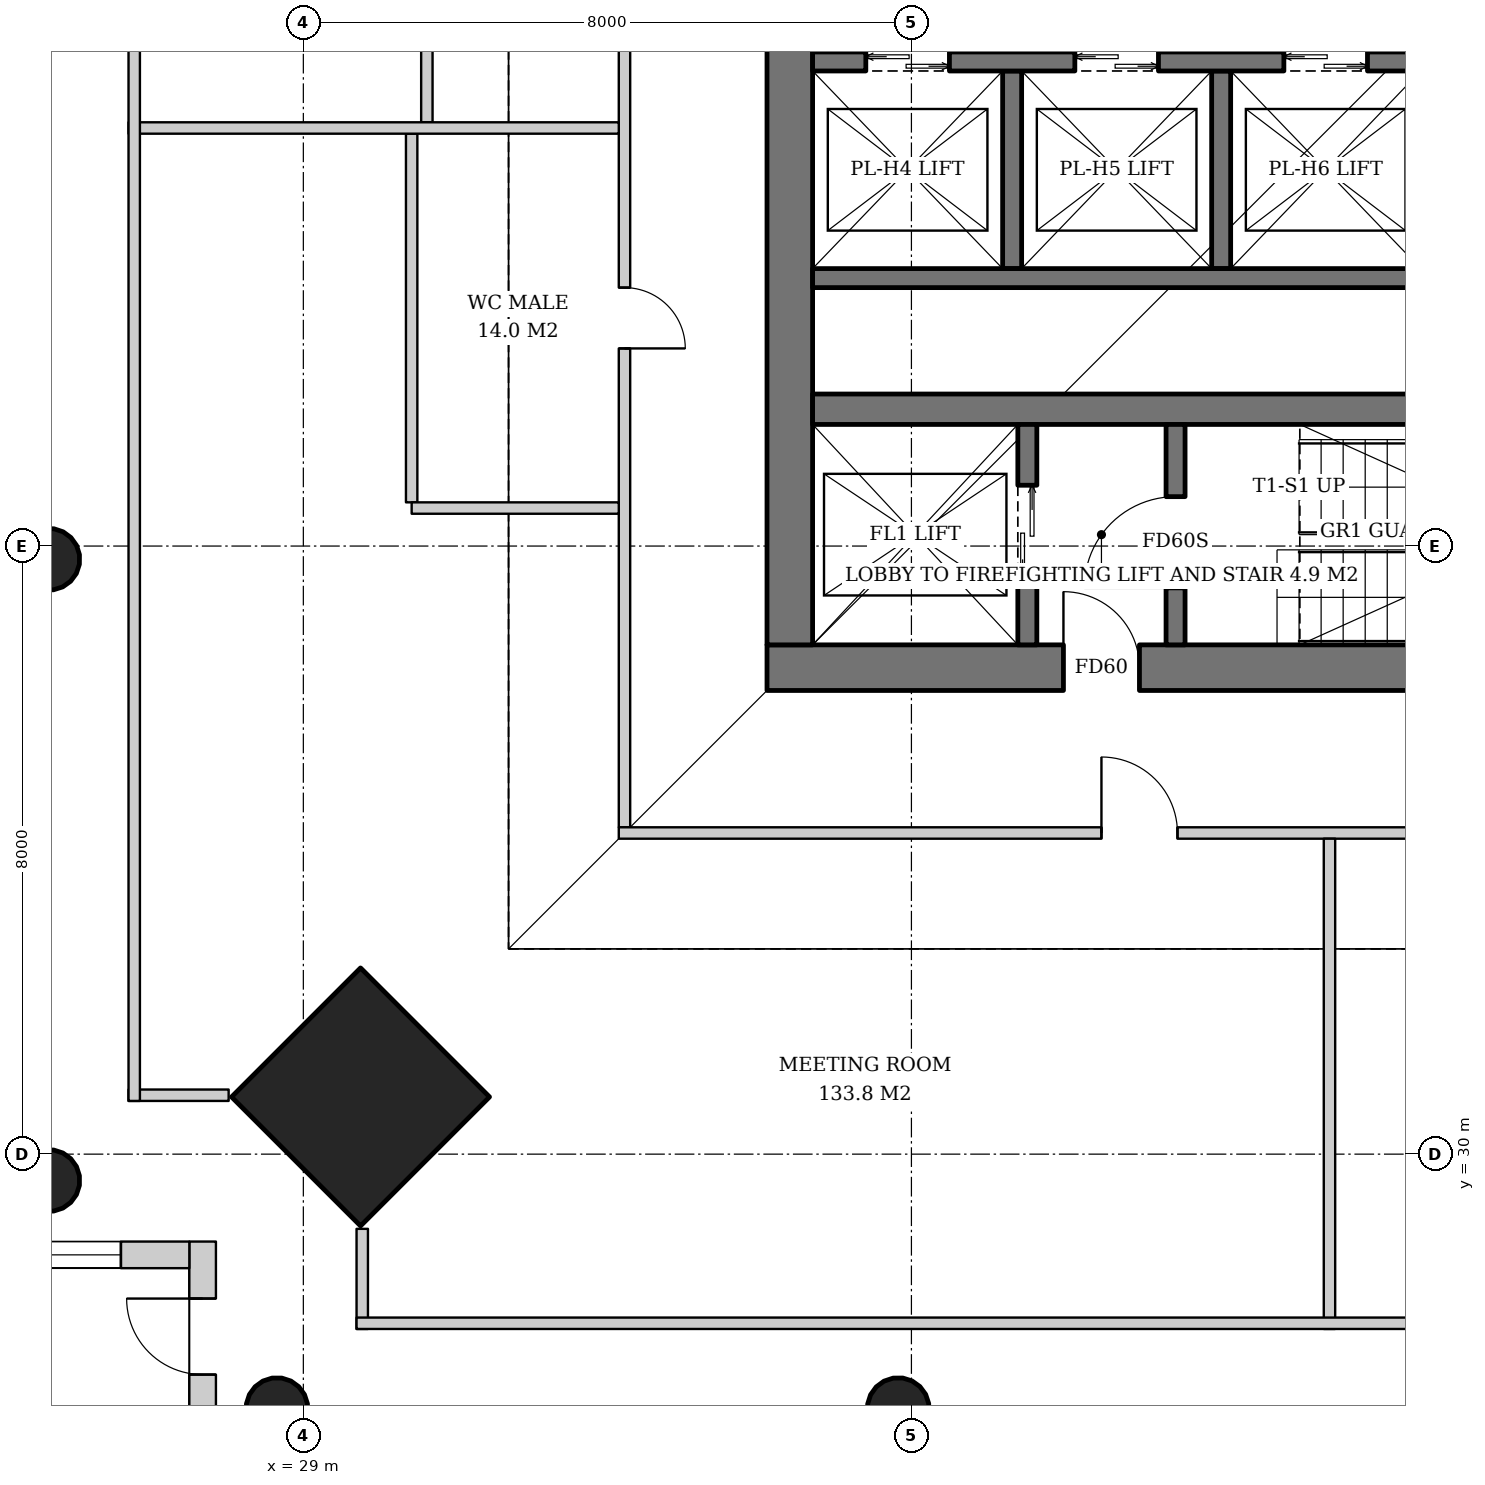
"""IFC4 building model, lengths in metres.
Left out: names, types, materials, properties, quantities, classifications, styles, units other than length and angle.
Written with IfcOpenShell. Run it as: python <this file> out.ifc"""

import sys

from ifc_helpers import new_model, si_unit, direction, frame, frame_2d, origin, origin_2d, place, context, subcontext, project, spatial, rectangle, hollow_circle, extrude, element, fill, save


model = new_model("IFC4")
c1 = context("Model", 3, precision=1e-05, world=origin(), true_north=direction((0.0, 1.0)))
c2 = subcontext(c1, "Body", "Model", "MODEL_VIEW")
j1 = project(units=[si_unit("LENGTHUNIT", "METRE"), si_unit("PLANEANGLEUNIT", "RADIAN")], contexts=[c1])
p1 = place(None, origin())
s1 = spatial("IfcSite", under=j1, at=p1, CompositionType="ELEMENT")
p2 = place(p1, origin())
s2 = spatial("IfcBuilding", under=s1, at=p2, CompositionType="ELEMENT")
p3 = place(p2, frame((0.0, 0.0, 165.4)))
s3 = spatial("IfcBuildingStorey", under=s2, at=p3, CompositionType="ELEMENT", Elevation=165.4)
p4 = place(p3, frame((29.714, 30.714, 0.0), z_axis=(0.031898107953, 0.031898107953, 0.998981992539), x_axis=(-0.707106781187, 0.707106781187, 0.0)))
e1 = element("IfcColumn", 1, at=p4, inside=s3, PredefinedType="COLUMN", context=c2, shape_type="SweptSolid", body=[
    extrude(rectangle(XDim=2.4, YDim=2.4, at=origin_2d()), origin(), (0.0, 0.0, 1.0), 3.804),
])
p5 = place(p3, frame((25.614, 29.614, 0.0), z_axis=(0.031898107953, 0.031898107953, 0.998981992539), x_axis=(-0.707106781187, 0.707106781187, 0.0)))
e2 = element("IfcColumn", 2, at=p5, inside=s3, PredefinedType="COLUMN", context=c2, shape_type="SweptSolid", body=[
    extrude(hollow_circle(Radius=0.406, WallThickness=0.03, at=origin_2d()), origin(), (0.0, 0.0, 1.0), 3.804),
])
p6 = place(p3, frame((25.614, 37.807, 0.0), z_axis=(0.031910269556, 0.015987237665, 0.999362868496), x_axis=(-0.447933021895, 0.894067115991, 0.0)))
e3 = element("IfcColumn", 3, at=p6, inside=s3, PredefinedType="COLUMN", context=c2, shape_type="SweptSolid", body=[
    extrude(hollow_circle(Radius=0.406, WallThickness=0.03, at=origin_2d()), origin(), (0.0, 0.0, 1.0), 3.802),
])
p7 = place(p3, frame((28.614, 26.614, 0.0), z_axis=(0.031898107953, 0.031898107953, 0.998981992539), x_axis=(-0.707106781187, 0.707106781187, 0.0)))
e4 = element("IfcColumn", 4, at=p7, inside=s3, PredefinedType="COLUMN", context=c2, shape_type="SweptSolid", body=[
    extrude(hollow_circle(Radius=0.406, WallThickness=0.03, at=origin_2d()), origin(), (0.0, 0.0, 1.0), 3.804),
])
p8 = place(p3, frame((36.807, 26.614, 0.0), z_axis=(0.015987237665, 0.031910269556, 0.999362868496), x_axis=(-0.894067115991, 0.447933021895, 0.0)))
e5 = element("IfcColumn", 5, at=p8, inside=s3, PredefinedType="COLUMN", context=c2, shape_type="SweptSolid", body=[
    extrude(hollow_circle(Radius=0.406, WallThickness=0.03, at=origin_2d()), origin(), (0.0, 0.0, 1.0), 3.802),
])
p9 = place(p3, frame((35.1, 36.4, 0.0), z_axis=(0.0, 0.0, 1.0), x_axis=(1.0, 0.0, 0.0)))
e6 = element("IfcWall", 6, at=p9, inside=s3, PredefinedType="SHEAR", context=c2, shape_type="SweptSolid", body=[
    extrude(rectangle(XDim=19.8, YDim=0.6, at=frame_2d((9.9, 0.0))), origin(), (0.0, 0.0, 1.0), 3.8),
])
p10 = place(p9, frame((3.9, 0.0, 0.0)))
e7 = element("IfcOpeningElement", 7, at=p10, cuts=e6, PredefinedType="OPENING", context=c2, shape_type="SweptSolid", body=[
    extrude(rectangle(XDim=1.0, YDim=2.1, at=frame_2d((0.5, 1.05))), frame((0.0, 0.31, 0.0), z_axis=(0.0, -1.0, 0.0), x_axis=(1.0, 0.0, 0.0)), (0.0, 0.0, 1.0), 0.62),
])
p11 = place(p9, frame((15.35, 0.0, 0.0)))
e8 = element("IfcOpeningElement", 8, at=p11, cuts=e6, PredefinedType="OPENING", context=c2, shape_type="SweptSolid", body=[
    extrude(rectangle(XDim=1.0, YDim=2.1, at=frame_2d((0.5, 1.05))), frame((0.0, 0.31, 0.0), z_axis=(0.0, -1.0, 0.0), x_axis=(1.0, 0.0, 0.0)), (0.0, 0.0, 1.0), 0.62),
])
p12 = place(p3, frame((35.4, 36.7, 0.0), z_axis=(0.0, 0.0, 1.0), x_axis=(0.0, 1.0, 0.0)))
e9 = element("IfcWall", 9, at=p12, inside=s3, PredefinedType="SHEAR", context=c2, shape_type="SweptSolid", body=[
    extrude(rectangle(XDim=18.6, YDim=0.6, at=frame_2d((9.3, 0.0))), origin(), (0.0, 0.0, 1.0), 3.8),
])
p13 = place(p12, frame((8.4, 0.0, 0.0)))
e10 = element("IfcOpeningElement", 10, at=p13, cuts=e9, PredefinedType="OPENING", context=c2, shape_type="SweptSolid", body=[
    extrude(rectangle(XDim=1.8, YDim=2.4, at=frame_2d((0.9, 1.2))), frame((0.0, 0.31, 0.0), z_axis=(0.0, -1.0, 0.0), x_axis=(1.0, 0.0, 0.0)), (0.0, 0.0, 1.0), 0.62),
])
p14 = place(p3, frame((35.7, 39.8, 0.0), z_axis=(0.0, 0.0, 1.0), x_axis=(1.0, 0.0, 0.0)))
e11 = element("IfcWall", 11, at=p14, inside=s3, PredefinedType="SHEAR", context=c2, shape_type="SweptSolid", body=[
    extrude(rectangle(XDim=18.6, YDim=0.4, at=frame_2d((9.3, 0.0))), origin(), (0.0, 0.0, 1.0), 3.8),
])
p15 = place(p3, frame((27.675, 25.5, 0.0), z_axis=(0.0, 0.0, 1.0), x_axis=(0.0, 1.0, 0.0)))
e12 = element("IfcWall", 12, at=p15, inside=s3, PredefinedType="SOLIDWALL", context=c2, shape_type="SweptSolid", body=[
    extrude(rectangle(XDim=3.35, YDim=0.35, at=frame_2d((1.675, 0.0))), origin(), (0.0, 0.0, 1.0), 3.62),
])
p16 = place(p15, frame((1.6, 0.0, 0.0)))
e13 = element("IfcOpeningElement", 13, at=p16, cuts=e12, PredefinedType="OPENING", context=c2, shape_type="SweptSolid", body=[
    extrude(rectangle(XDim=1.0, YDim=2.4, at=frame_2d((0.5, 1.2))), frame((0.0, 0.185, 0.0), z_axis=(0.0, -1.0, 0.0), x_axis=(1.0, 0.0, 0.0)), (0.0, 0.0, 1.0), 0.37),
])
p17 = place(p3, frame((27.5, 28.675, 0.0), z_axis=(0.0, 0.0, 1.0), x_axis=(-1.0, 0.0, 0.0)))
e14 = element("IfcWall", 14, at=p17, inside=s3, PredefinedType="SOLIDWALL", context=c2, shape_type="SweptSolid", body=[
    extrude(rectangle(XDim=3.0, YDim=0.35, at=frame_2d((1.5, 0.0))), origin(), (0.0, 0.0, 1.0), 3.62),
])
p18 = place(p17, frame((0.9, 0.0, 0.6)))
e15 = element("IfcOpeningElement", 15, at=p18, cuts=e14, PredefinedType="OPENING", context=c2, shape_type="SweptSolid", body=[
    extrude(rectangle(XDim=1.2, YDim=2.55, at=frame_2d((0.6, 1.275))), frame((0.0, 0.185, 0.0), z_axis=(0.0, -1.0, 0.0), x_axis=(1.0, 0.0, 0.0)), (0.0, 0.0, 1.0), 0.37),
])
p19 = place(p3, frame((38.525, 36.7, 0.0), z_axis=(0.0, 0.0, 1.0), x_axis=(0.0, 1.0, 0.0)))
e16 = element("IfcWall", 16, at=p19, inside=s3, PredefinedType="SHEAR", context=c2, shape_type="SweptSolid", body=[
    extrude(rectangle(XDim=2.9, YDim=0.25, at=frame_2d((1.45, 0.0))), origin(), (0.0, 0.0, 1.0), 3.8),
])
p20 = place(p19, frame((0.8, 0.0, 0.0)))
e17 = element("IfcOpeningElement", 17, at=p20, cuts=e16, PredefinedType="OPENING", context=c2, shape_type="SweptSolid", body=[
    extrude(rectangle(XDim=1.3, YDim=2.2, at=frame_2d((0.65, 1.1))), frame((0.0, 0.135, 0.0), z_axis=(0.0, -1.0, 0.0), x_axis=(1.0, 0.0, 0.0)), (0.0, 0.0, 1.0), 0.27),
])
p21 = place(p3, frame((40.475, 36.7, 0.0), z_axis=(0.0, 0.0, 1.0), x_axis=(0.0, 1.0, 0.0)))
e18 = element("IfcWall", 18, at=p21, inside=s3, PredefinedType="SHEAR", context=c2, shape_type="SweptSolid", body=[
    extrude(rectangle(XDim=2.9, YDim=0.25, at=frame_2d((1.45, 0.0))), origin(), (0.0, 0.0, 1.0), 3.8),
])
p22 = place(p21, frame((0.75, 0.0, 0.0)))
e19 = element("IfcOpeningElement", 19, at=p22, cuts=e18, PredefinedType="OPENING", context=c2, shape_type="SweptSolid", body=[
    extrude(rectangle(XDim=1.2, YDim=2.1, at=frame_2d((0.6, 1.05))), frame((0.0, 0.135, 0.0), z_axis=(0.0, -1.0, 0.0), x_axis=(1.0, 0.0, 0.0)), (0.0, 0.0, 1.0), 0.27),
])
for number, where, z_axis, x_axis in (
    (20, (38.325, 44.25, 0.0), (0.0, 0.0, 1.0), (0.0, -1.0, 0.0)),
    (21, (41.075, 44.25, 0.0), (0.0, 0.0, 1.0), (0.0, -1.0, 0.0)),
):
    element("IfcWall", number, at=place(p3, frame(where, z_axis=z_axis, x_axis=x_axis)), inside=s3, PredefinedType="SHEAR", context=c2, shape_type="SweptSolid", body=[
        extrude(rectangle(XDim=2.6, YDim=0.25, at=frame_2d((1.3, 0.0))), origin(), (0.0, 0.0, 1.0), 3.8),
    ])
p23 = place(p3, frame((35.7, 41.525, 0.0), z_axis=(0.0, 0.0, 1.0), x_axis=(1.0, 0.0, 0.0)))
e22 = element("IfcWall", 22, at=p23, inside=s3, PredefinedType="SHEAR", context=c2, shape_type="SweptSolid", body=[
    extrude(rectangle(XDim=11.0, YDim=0.25, at=frame_2d((5.5, 0.0))), origin(), (0.0, 0.0, 1.0), 3.8),
])
p24 = place(p3, frame((35.7, 44.375, 0.0), z_axis=(0.0, 0.0, 1.0), x_axis=(1.0, 0.0, 0.0)))
e23 = element("IfcWall", 23, at=p24, inside=s3, PredefinedType="SHEAR", context=c2, shape_type="SweptSolid", body=[
    extrude(rectangle(XDim=12.83, YDim=0.25, at=frame_2d((6.415, 0.0))), origin(), (0.0, 0.0, 1.0), 3.8),
])
p25 = place(p24, frame((0.7, 0.0, 0.0)))
e24 = element("IfcOpeningElement", 24, at=p25, cuts=e23, PredefinedType="OPENING", context=c2, shape_type="SweptSolid", body=[
    extrude(rectangle(XDim=1.1, YDim=2.2, at=frame_2d((0.55, 1.1))), frame((0.0, 0.135, 0.0), z_axis=(0.0, -1.0, 0.0), x_axis=(1.0, 0.0, 0.0)), (0.0, 0.0, 1.0), 0.27),
])
p26 = place(p24, frame((3.45, 0.0, 0.0)))
e25 = element("IfcOpeningElement", 25, at=p26, cuts=e23, PredefinedType="OPENING", context=c2, shape_type="SweptSolid", body=[
    extrude(rectangle(XDim=1.1, YDim=2.2, at=frame_2d((0.55, 1.1))), frame((0.0, 0.135, 0.0), z_axis=(0.0, -1.0, 0.0), x_axis=(1.0, 0.0, 0.0)), (0.0, 0.0, 1.0), 0.27),
])
p27 = place(p24, frame((6.2, 0.0, 0.0)))
e26 = element("IfcOpeningElement", 26, at=p27, cuts=e23, PredefinedType="OPENING", context=c2, shape_type="SweptSolid", body=[
    extrude(rectangle(XDim=1.1, YDim=2.2, at=frame_2d((0.55, 1.1))), frame((0.0, 0.135, 0.0), z_axis=(0.0, -1.0, 0.0), x_axis=(1.0, 0.0, 0.0)), (0.0, 0.0, 1.0), 0.27),
])
p28 = place(p24, frame((9.0, 0.0, 0.0)))
e27 = element("IfcOpeningElement", 27, at=p28, cuts=e23, PredefinedType="OPENING", context=c2, shape_type="SweptSolid", body=[
    extrude(rectangle(XDim=1.0, YDim=2.1, at=frame_2d((0.5, 1.05))), frame((0.0, 0.135, 0.0), z_axis=(0.0, -1.0, 0.0), x_axis=(1.0, 0.0, 0.0)), (0.0, 0.0, 1.0), 0.27),
])
p29 = place(p24, frame((11.515, 0.0, 0.0)))
e28 = element("IfcOpeningElement", 28, at=p29, cuts=e23, PredefinedType="OPENING", context=c2, shape_type="SweptSolid", body=[
    extrude(rectangle(XDim=0.8, YDim=2.0, at=frame_2d((0.4, 1.0))), frame((0.0, 0.135, 0.0), z_axis=(0.0, -1.0, 0.0), x_axis=(1.0, 0.0, 0.0)), (0.0, 0.0, 1.0), 0.27),
])
for number, where, z_axis, x_axis in (
    (29, (30.625, 48.425, 0.0), (0.0, 0.0, 1.0), (0.0, -1.0, 0.0)),
    (30, (30.425, 43.425, 0.0), (0.0, 0.0, 1.0), (0.0, -1.0, 0.0)),
):
    element("IfcWall", number, at=place(p3, frame(where, z_axis=z_axis, x_axis=x_axis)), inside=s3, PredefinedType="PARTITIONING", context=c2, shape_type="SweptSolid", body=[
        extrude(rectangle(XDim=4.85, YDim=0.15, at=frame_2d((2.425, 0.0))), origin(), (0.0, 0.0, 1.0), 2.85),
    ])
p30 = place(p3, frame((33.225, 57.85, 0.0), z_axis=(0.0, 0.0, 1.0), x_axis=(0.0, -1.0, 0.0)))
e31 = element("IfcWall", 31, at=p30, inside=s3, PredefinedType="PARTITIONING", context=c2, shape_type="SweptSolid", body=[
    extrude(rectangle(XDim=23.55, YDim=0.15, at=frame_2d((11.775, 0.0))), origin(), (0.0, 0.0, 1.0), 2.85),
])
p31 = place(p30, frame((6.45, 0.0, 0.0)))
e32 = element("IfcOpeningElement", 32, at=p31, cuts=e31, PredefinedType="OPENING", context=c2, shape_type="SweptSolid", body=[
    extrude(rectangle(XDim=0.8, YDim=2.1, at=frame_2d((0.4, 1.05))), frame((0.0, 0.085, 0.0), z_axis=(0.0, -1.0, 0.0), x_axis=(1.0, 0.0, 0.0)), (0.0, 0.0, 1.0), 0.17),
])
p32 = place(p30, frame((11.35, 0.0, 0.0)))
e33 = element("IfcOpeningElement", 33, at=p32, cuts=e31, PredefinedType="OPENING", context=c2, shape_type="SweptSolid", body=[
    extrude(rectangle(XDim=1.0, YDim=2.1, at=frame_2d((0.5, 1.05))), frame((0.0, 0.085, 0.0), z_axis=(0.0, -1.0, 0.0), x_axis=(1.0, 0.0, 0.0)), (0.0, 0.0, 1.0), 0.17),
])
p33 = place(p30, frame((16.45, 0.0, 0.0)))
e34 = element("IfcOpeningElement", 34, at=p33, cuts=e31, PredefinedType="OPENING", context=c2, shape_type="SweptSolid", body=[
    extrude(rectangle(XDim=0.8, YDim=2.1, at=frame_2d((0.4, 1.05))), frame((0.0, 0.085, 0.0), z_axis=(0.0, -1.0, 0.0), x_axis=(1.0, 0.0, 0.0)), (0.0, 0.0, 1.0), 0.17),
])
p34 = place(p30, frame((1.3, 0.0, 0.0)))
e35 = element("IfcOpeningElement", 35, at=p34, cuts=e31, PredefinedType="OPENING", context=c2, shape_type="SweptSolid", body=[
    extrude(rectangle(XDim=1.8, YDim=2.4, at=frame_2d((0.9, 1.2))), frame((0.0, 0.085, 0.0), z_axis=(0.0, -1.0, 0.0), x_axis=(1.0, 0.0, 0.0)), (0.0, 0.0, 1.0), 0.17),
])
p35 = place(p3, frame((33.15, 43.5, 0.0), z_axis=(0.0, 0.0, 1.0), x_axis=(-1.0, 0.0, 0.0)))
e36 = element("IfcWall", 36, at=p35, inside=s3, PredefinedType="PARTITIONING", context=c2, shape_type="SweptSolid", body=[
    extrude(rectangle(XDim=6.45, YDim=0.15, at=frame_2d((3.225, 0.0))), origin(), (0.0, 0.0, 1.0), 3.62),
])
p36 = place(p3, frame((33.15, 38.5, 0.0), z_axis=(0.0, 0.0, 1.0), x_axis=(-1.0, 0.0, 0.0)))
e37 = element("IfcWall", 37, at=p36, inside=s3, PredefinedType="PARTITIONING", context=c2, shape_type="SweptSolid", body=[
    extrude(rectangle(XDim=2.725, YDim=0.15, at=frame_2d((1.362, 0.0))), origin(), (0.0, 0.0, 1.0), 3.62),
])
p37 = place(p3, frame((33.15, 34.225, 0.0), z_axis=(0.0, 0.0, 1.0), x_axis=(1.0, 0.0, 0.0)))
e38 = element("IfcWall", 38, at=p37, inside=s3, PredefinedType="PARTITIONING", context=c2, shape_type="SweptSolid", body=[
    extrude(rectangle(XDim=23.55, YDim=0.15, at=frame_2d((11.775, 0.0))), origin(), (0.0, 0.0, 1.0), 2.85),
])
p38 = place(p37, frame((6.35, 0.0, 0.0)))
e39 = element("IfcOpeningElement", 39, at=p38, cuts=e38, PredefinedType="OPENING", context=c2, shape_type="SweptSolid", body=[
    extrude(rectangle(XDim=1.0, YDim=2.1, at=frame_2d((0.5, 1.05))), frame((0.0, 0.085, 0.0), z_axis=(0.0, -1.0, 0.0), x_axis=(1.0, 0.0, 0.0)), (0.0, 0.0, 1.0), 0.17),
])
p39 = place(p37, frame((11.35, 0.0, 0.0)))
e40 = element("IfcOpeningElement", 40, at=p39, cuts=e38, PredefinedType="OPENING", context=c2, shape_type="SweptSolid", body=[
    extrude(rectangle(XDim=1.0, YDim=2.1, at=frame_2d((0.5, 1.05))), frame((0.0, 0.085, 0.0), z_axis=(0.0, -1.0, 0.0), x_axis=(1.0, 0.0, 0.0)), (0.0, 0.0, 1.0), 0.17),
])
p40 = place(p37, frame((16.35, 0.0, 0.0)))
e41 = element("IfcOpeningElement", 41, at=p40, cuts=e38, PredefinedType="OPENING", context=c2, shape_type="SweptSolid", body=[
    extrude(rectangle(XDim=1.0, YDim=2.1, at=frame_2d((0.5, 1.05))), frame((0.0, 0.085, 0.0), z_axis=(0.0, -1.0, 0.0), x_axis=(1.0, 0.0, 0.0)), (0.0, 0.0, 1.0), 0.17),
])
p41 = place(p3, frame((42.5, 34.15, 0.0), z_axis=(0.0, 0.0, 1.0), x_axis=(0.0, -1.0, 0.0)))
e42 = element("IfcWall", 42, at=p41, inside=s3, PredefinedType="PARTITIONING", context=c2, shape_type="SweptSolid", body=[
    extrude(rectangle(XDim=6.45, YDim=0.15, at=frame_2d((3.225, 0.0))), origin(), (0.0, 0.0, 1.0), 3.62),
])
for number, where, z_axis, x_axis in (
    (43, (29.775, 27.7, 0.0), (0.0, 0.0, 1.0), (0.0, 1.0, 0.0)),
    (44, (28.017, 30.775, 0.0), (0.0, 0.0, 1.0), (-1.0, 0.0, 0.0)),
):
    element("IfcWall", number, at=place(p3, frame(where, z_axis=z_axis, x_axis=x_axis)), inside=s3, PredefinedType="PARTITIONING", context=c2, shape_type="SweptSolid", body=[
        extrude(rectangle(XDim=1.317, YDim=0.15, at=frame_2d((0.659, 0.0))), origin(), (0.0, 0.0, 1.0), 3.62),
    ])
for number, where, z_axis, x_axis in (
    (45, (26.775, 30.7, 0.0), (0.0, 0.0, 1.0), (0.0, 1.0, 0.0)),
    (46, (60.3, 27.775, 0.0), (0.0, 0.0, 1.0), (-1.0, 0.0, 0.0)),
):
    element("IfcWall", number, at=place(p3, frame(where, z_axis=z_axis, x_axis=x_axis)), inside=s3, PredefinedType="PARTITIONING", context=c2, shape_type="SweptSolid", body=[
        extrude(rectangle(XDim=30.6, YDim=0.15, at=frame_2d((15.3, 0.0))), origin(), (0.0, 0.0, 1.0), 2.85),
    ])
p42 = place(p16, origin())
e47 = element("IfcDoor", 47, at=p42, inside=s3, OperationType="SINGLE_SWING_RIGHT", PredefinedType="DOOR", context=c2, shape_type="SweptSolid", body=[
    extrude(rectangle(XDim=1.0, YDim=2.4, at=frame_2d((0.5, 1.2))), frame((0.0, 0.025, 0.0), z_axis=(0.0, -1.0, 0.0), x_axis=(1.0, 0.0, 0.0)), (0.0, 0.0, 1.0), 0.05),
])
fill(e13, e47)
p43 = place(p18, origin())
e48 = element("IfcWindow", 48, at=p43, inside=s3, PartitioningType="SINGLE_PANEL", PredefinedType="WINDOW", context=c2, shape_type="SweptSolid", body=[
    extrude(rectangle(XDim=1.2, YDim=2.55, at=frame_2d((0.6, 1.275))), frame((0.0, 0.03, 0.0), z_axis=(0.0, -1.0, 0.0), x_axis=(1.0, 0.0, 0.0)), (0.0, 0.0, 1.0), 0.06),
])
fill(e15, e48)
p44 = place(p20, origin())
e49 = element("IfcDoor", 49, at=p44, inside=s3, OperationType="DOUBLE_DOOR_SLIDING", PredefinedType="DOOR", context=c2, shape_type="SweptSolid", body=[
    extrude(rectangle(XDim=1.3, YDim=2.2, at=frame_2d((0.65, 1.1))), frame((0.0, 0.025, 0.0), z_axis=(0.0, -1.0, 0.0), x_axis=(1.0, 0.0, 0.0)), (0.0, 0.0, 1.0), 0.05),
])
fill(e17, e49)
p45 = place(p22, origin())
e50 = element("IfcDoor", 50, at=p45, inside=s3, OperationType="SINGLE_SWING_LEFT", PredefinedType="DOOR", context=c2, shape_type="SweptSolid", body=[
    extrude(rectangle(XDim=1.2, YDim=2.1, at=frame_2d((0.6, 1.05))), frame((0.0, 0.025, 0.0), z_axis=(0.0, -1.0, 0.0), x_axis=(1.0, 0.0, 0.0)), (0.0, 0.0, 1.0), 0.05),
])
fill(e19, e50)
p46 = place(p25, origin())
e51 = element("IfcDoor", 51, at=p46, inside=s3, OperationType="DOUBLE_DOOR_SLIDING", PredefinedType="DOOR", context=c2, shape_type="SweptSolid", body=[
    extrude(rectangle(XDim=1.1, YDim=2.2, at=frame_2d((0.55, 1.1))), frame((0.0, 0.025, 0.0), z_axis=(0.0, -1.0, 0.0), x_axis=(1.0, 0.0, 0.0)), (0.0, 0.0, 1.0), 0.05),
])
fill(e24, e51)
p47 = place(p26, origin())
e52 = element("IfcDoor", 52, at=p47, inside=s3, OperationType="DOUBLE_DOOR_SLIDING", PredefinedType="DOOR", context=c2, shape_type="SweptSolid", body=[
    extrude(rectangle(XDim=1.1, YDim=2.2, at=frame_2d((0.55, 1.1))), frame((0.0, 0.025, 0.0), z_axis=(0.0, -1.0, 0.0), x_axis=(1.0, 0.0, 0.0)), (0.0, 0.0, 1.0), 0.05),
])
fill(e25, e52)
p48 = place(p27, origin())
e53 = element("IfcDoor", 53, at=p48, inside=s3, OperationType="DOUBLE_DOOR_SLIDING", PredefinedType="DOOR", context=c2, shape_type="SweptSolid", body=[
    extrude(rectangle(XDim=1.1, YDim=2.2, at=frame_2d((0.55, 1.1))), frame((0.0, 0.025, 0.0), z_axis=(0.0, -1.0, 0.0), x_axis=(1.0, 0.0, 0.0)), (0.0, 0.0, 1.0), 0.05),
])
fill(e26, e53)
p49 = place(p10, origin())
e54 = element("IfcDoor", 54, at=p49, inside=s3, OperationType="SINGLE_SWING_LEFT", PredefinedType="DOOR", context=c2, shape_type="SweptSolid", body=[
    extrude(rectangle(XDim=1.0, YDim=2.1, at=frame_2d((0.5, 1.05))), frame((0.0, 0.025, 0.0), z_axis=(0.0, -1.0, 0.0), x_axis=(1.0, 0.0, 0.0)), (0.0, 0.0, 1.0), 0.05),
])
fill(e7, e54)
p50 = place(p33, origin())
e55 = element("IfcDoor", 55, at=p50, inside=s3, OperationType="SINGLE_SWING_RIGHT", PredefinedType="DOOR", context=c2, shape_type="SweptSolid", body=[
    extrude(rectangle(XDim=0.8, YDim=2.1, at=frame_2d((0.4, 1.05))), frame((0.0, 0.025, 0.0), z_axis=(0.0, -1.0, 0.0), x_axis=(1.0, 0.0, 0.0)), (0.0, 0.0, 1.0), 0.05),
])
fill(e34, e55)
p51 = place(p38, origin())
e56 = element("IfcDoor", 56, at=p51, inside=s3, OperationType="SINGLE_SWING_LEFT", PredefinedType="DOOR", context=c2, shape_type="SweptSolid", body=[
    extrude(rectangle(XDim=1.0, YDim=2.1, at=frame_2d((0.5, 1.05))), frame((0.0, 0.025, 0.0), z_axis=(0.0, -1.0, 0.0), x_axis=(1.0, 0.0, 0.0)), (0.0, 0.0, 1.0), 0.05),
])
fill(e39, e56)
save(model, sys.argv[1])
